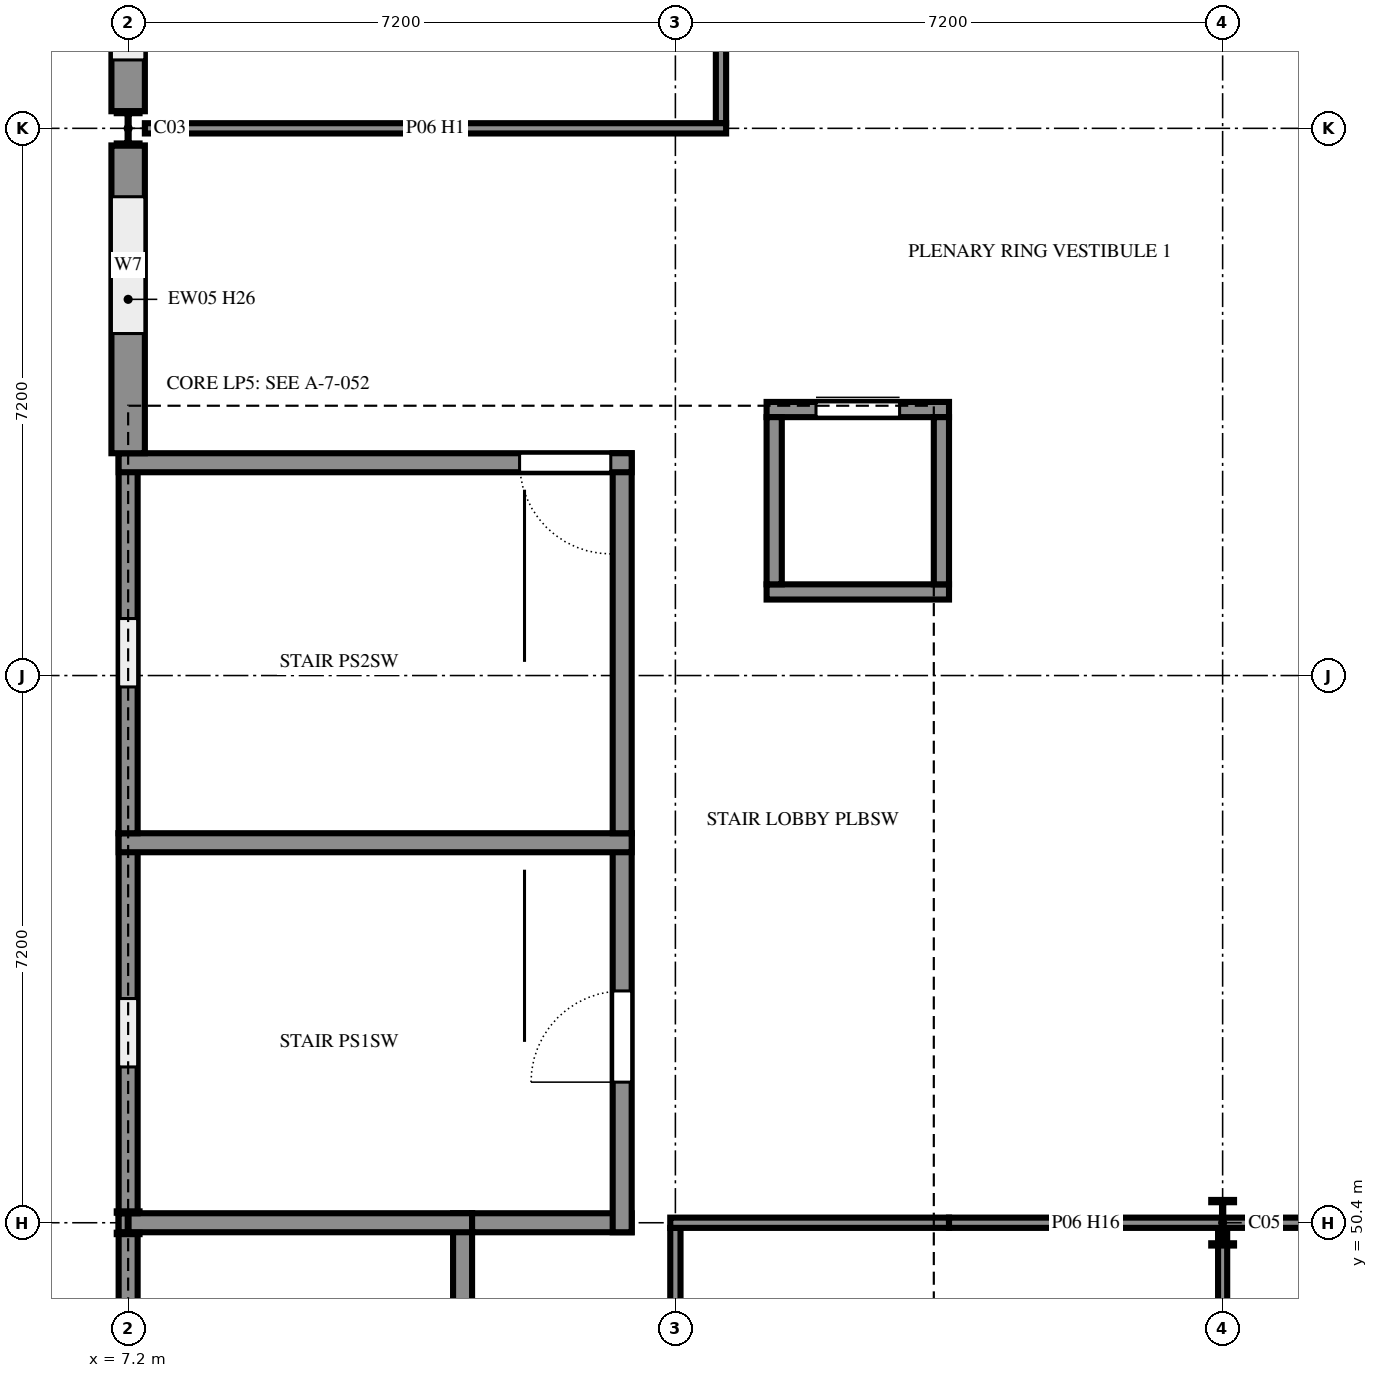
"""IFC4 building model, lengths in metres.
Left out: names, types, materials, properties, quantities, classifications, styles, units other than length and angle.
Written with IfcOpenShell. Run it as: python <this file> out.ifc"""

import sys

from ifc_helpers import new_model, si_unit, direction, frame, frame_2d, origin, origin_2d, place, context, subcontext, project, spatial, rectangle, i_section, extrude, element, fill, save


model = new_model("IFC4")
c1 = context("Model", 3, precision=1e-05, world=origin(), true_north=direction((0.0, 1.0)))
c2 = subcontext(c1, "Body", "Model", "MODEL_VIEW")
j1 = project(units=[si_unit("LENGTHUNIT", "METRE"), si_unit("PLANEANGLEUNIT", "RADIAN")], contexts=[c1])
p1 = place(None, origin())
s1 = spatial("IfcSite", under=j1, at=p1, CompositionType="ELEMENT")
p2 = place(p1, origin())
s2 = spatial("IfcBuilding", under=s1, at=p2, CompositionType="ELEMENT")
p3 = place(p2, frame((0.0, 0.0, 14.4)))
s3 = spatial("IfcBuildingStorey", under=s2, at=p3, CompositionType="ELEMENT", Elevation=14.4)
p4 = place(p3, frame((7.2, 50.4, 0.0), z_axis=(0.0, 0.0, 1.0), x_axis=(1.0, 0.0, 0.0)))
e1 = element("IfcColumn", 1, at=p4, inside=s3, PredefinedType="COLUMN", context=c2, shape_type="SweptSolid", body=[
    extrude(i_section(OverallWidth=0.3, OverallDepth=0.3, WebThickness=0.011, FlangeThickness=0.019, FilletRadius=0.027, at=origin_2d()), origin(), (0.0, 0.0, 1.0), 3.6),
])
p5 = place(p3, frame((21.6, 50.4, 0.0), z_axis=(0.0, 0.0, 1.0), x_axis=(1.0, 0.0, 0.0)))
e2 = element("IfcColumn", 2, at=p5, inside=s3, PredefinedType="COLUMN", context=c2, shape_type="SweptSolid", body=[
    extrude(i_section(OverallWidth=0.3, OverallDepth=0.6, WebThickness=0.015, FlangeThickness=0.03, FilletRadius=0.027, at=origin_2d()), origin(), (0.0, 0.0, 1.0), 3.6),
])
p6 = place(p3, frame((7.2, 64.8, 0.0), z_axis=(0.0, 0.0, 1.0), x_axis=(1.0, 0.0, 0.0)))
e3 = element("IfcColumn", 3, at=p6, inside=s3, PredefinedType="COLUMN", context=c2, shape_type="SweptSolid", body=[
    extrude(i_section(OverallWidth=0.3, OverallDepth=0.45, WebThickness=0.014, FlangeThickness=0.026, FilletRadius=0.027, at=origin_2d()), origin(), (0.0, 0.0, 1.0), 3.6),
])
p7 = place(p3, frame((11.6, 44.275, 0.0), z_axis=(0.0, 0.0, 1.0), x_axis=(0.0, 1.0, 0.0)))
e4 = element("IfcWall", 4, at=p7, inside=s3, PredefinedType="SHEAR", context=c2, shape_type="SweptSolid", body=[
    extrude(rectangle(XDim=6.25, YDim=0.25, at=frame_2d((3.125, 0.0))), origin(), (0.0, 0.0, 1.0), 3.6),
])
p8 = place(p7, frame((0.375, 0.0, 0.0)))
e5 = element("IfcOpeningElement", 5, at=p8, cuts=e4, PredefinedType="OPENING", context=c2, shape_type="SweptSolid", body=[
    extrude(rectangle(XDim=1.0, YDim=2.4, at=frame_2d((0.5, 1.2))), frame((0.0, 0.135, 0.0), z_axis=(0.0, -1.0, 0.0), x_axis=(1.0, 0.0, 0.0)), (0.0, 0.0, 1.0), 0.27),
])
p9 = place(p3, frame((7.2, 50.525, 0.0), z_axis=(0.0, 0.0, 1.0), x_axis=(0.0, -1.0, 0.0)))
e6 = element("IfcWall", 6, at=p9, inside=s3, PredefinedType="SHEAR", context=c2, shape_type="SweptSolid", body=[
    extrude(rectangle(XDim=6.25, YDim=0.25, at=frame_2d((3.125, 0.0))), origin(), (0.0, 0.0, 1.0), 3.6),
])
p10 = place(p9, frame((2.675, 0.0, 0.6)))
e7 = element("IfcOpeningElement", 7, at=p10, cuts=e6, PredefinedType="OPENING", context=c2, shape_type="SweptSolid", body=[
    extrude(rectangle(XDim=0.9, YDim=2.1, at=frame_2d((0.45, 1.05))), frame((0.0, 0.135, 0.0), z_axis=(0.0, -1.0, 0.0), x_axis=(1.0, 0.0, 0.0)), (0.0, 0.0, 1.0), 0.27),
])
p11 = place(p3, frame((11.725, 50.4, 0.0), z_axis=(0.0, 0.0, 1.0), x_axis=(-1.0, 0.0, 0.0)))
e8 = element("IfcWall", 8, at=p11, inside=s3, PredefinedType="SHEAR", context=c2, shape_type="SweptSolid", body=[
    extrude(rectangle(XDim=4.65, YDim=0.25, at=frame_2d((2.325, 0.0))), origin(), (0.0, 0.0, 1.0), 3.6),
])
p12 = place(p3, frame((11.725, 50.4, 0.0), z_axis=(0.0, 0.0, 1.0), x_axis=(1.0, 0.0, 0.0)))
e9 = element("IfcWall", 9, at=p12, inside=s3, PredefinedType="SHEAR", context=c2, shape_type="SweptSolid", body=[
    extrude(rectangle(XDim=2.1, YDim=0.25, at=frame_2d((1.05, 0.0))), origin(), (0.0, 0.0, 1.0), 3.6),
])
p13 = place(p3, frame((13.7, 50.275, 0.0), z_axis=(0.0, 0.0, 1.0), x_axis=(0.0, 1.0, 0.0)))
e10 = element("IfcWall", 10, at=p13, inside=s3, PredefinedType="SHEAR", context=c2, shape_type="SweptSolid", body=[
    extrude(rectangle(XDim=5.25, YDim=0.25, at=frame_2d((2.625, 0.0))), origin(), (0.0, 0.0, 1.0), 3.6),
])
p14 = place(p13, frame((1.975, 0.0, 0.0)))
e11 = element("IfcOpeningElement", 11, at=p14, cuts=e10, PredefinedType="OPENING", context=c2, shape_type="SweptSolid", body=[
    extrude(rectangle(XDim=1.2, YDim=2.4, at=frame_2d((0.6, 1.2))), frame((0.0, 0.135, 0.0), z_axis=(0.0, -1.0, 0.0), x_axis=(1.0, 0.0, 0.0)), (0.0, 0.0, 1.0), 0.27),
])
p15 = place(p3, frame((7.2, 55.525, 0.0), z_axis=(0.0, 0.0, 1.0), x_axis=(0.0, -1.0, 0.0)))
e12 = element("IfcWall", 12, at=p15, inside=s3, PredefinedType="SHEAR", context=c2, shape_type="SweptSolid", body=[
    extrude(rectangle(XDim=5.0, YDim=0.25, at=frame_2d((2.5, 0.0))), origin(), (0.0, 0.0, 1.0), 3.6),
])
p16 = place(p15, frame((2.175, 0.0, 0.6)))
e13 = element("IfcOpeningElement", 13, at=p16, cuts=e12, PredefinedType="OPENING", context=c2, shape_type="SweptSolid", body=[
    extrude(rectangle(XDim=0.9, YDim=2.1, at=frame_2d((0.45, 1.05))), frame((0.0, 0.135, 0.0), z_axis=(0.0, -1.0, 0.0), x_axis=(1.0, 0.0, 0.0)), (0.0, 0.0, 1.0), 0.27),
])
p17 = place(p3, frame((13.825, 55.4, 0.0), z_axis=(0.0, 0.0, 1.0), x_axis=(-1.0, 0.0, 0.0)))
e14 = element("IfcWall", 14, at=p17, inside=s3, PredefinedType="SHEAR", context=c2, shape_type="SweptSolid", body=[
    extrude(rectangle(XDim=6.75, YDim=0.25, at=frame_2d((3.375, 0.0))), origin(), (0.0, 0.0, 1.0), 3.6),
])
p18 = place(p3, frame((13.7, 55.525, 0.0), z_axis=(0.0, 0.0, 1.0), x_axis=(0.0, 1.0, 0.0)))
e15 = element("IfcWall", 15, at=p18, inside=s3, PredefinedType="SHEAR", context=c2, shape_type="SweptSolid", body=[
    extrude(rectangle(XDim=5.0, YDim=0.25, at=frame_2d((2.5, 0.0))), origin(), (0.0, 0.0, 1.0), 3.6),
])
p19 = place(p3, frame((7.2, 60.525, 0.0), z_axis=(0.0, 0.0, 1.0), x_axis=(0.0, -1.0, 0.0)))
e16 = element("IfcWall", 16, at=p19, inside=s3, PredefinedType="SHEAR", context=c2, shape_type="SweptSolid", body=[
    extrude(rectangle(XDim=5.0, YDim=0.25, at=frame_2d((2.5, 0.0))), origin(), (0.0, 0.0, 1.0), 3.6),
])
p20 = place(p19, frame((2.175, 0.0, 0.6)))
e17 = element("IfcOpeningElement", 17, at=p20, cuts=e16, PredefinedType="OPENING", context=c2, shape_type="SweptSolid", body=[
    extrude(rectangle(XDim=0.9, YDim=2.1, at=frame_2d((0.45, 1.05))), frame((0.0, 0.135, 0.0), z_axis=(0.0, -1.0, 0.0), x_axis=(1.0, 0.0, 0.0)), (0.0, 0.0, 1.0), 0.27),
])
p21 = place(p3, frame((13.825, 60.4, 0.0), z_axis=(0.0, 0.0, 1.0), x_axis=(-1.0, 0.0, 0.0)))
e18 = element("IfcWall", 18, at=p21, inside=s3, PredefinedType="SHEAR", context=c2, shape_type="SweptSolid", body=[
    extrude(rectangle(XDim=6.75, YDim=0.25, at=frame_2d((3.375, 0.0))), origin(), (0.0, 0.0, 1.0), 3.6),
])
p22 = place(p21, frame((0.275, 0.0, 0.0)))
e19 = element("IfcOpeningElement", 19, at=p22, cuts=e18, PredefinedType="OPENING", context=c2, shape_type="SweptSolid", body=[
    extrude(rectangle(XDim=1.2, YDim=2.4, at=frame_2d((0.6, 1.2))), frame((0.0, 0.135, 0.0), z_axis=(0.0, -1.0, 0.0), x_axis=(1.0, 0.0, 0.0)), (0.0, 0.0, 1.0), 0.27),
])
p23 = place(p3, frame((7.2, 78.975, 0.0), z_axis=(0.0, 0.0, 1.0), x_axis=(0.0, -1.0, 0.0)))
e20 = element("IfcWall", 20, at=p23, inside=s3, PredefinedType="SOLIDWALL", context=c2, shape_type="SweptSolid", body=[
    extrude(rectangle(XDim=13.95, YDim=0.44, at=frame_2d((6.975, 0.0))), origin(), (0.0, 0.0, 1.0), 2.82),
])
p24 = place(p23, frame((11.475, 0.0, 0.75)))
e21 = element("IfcOpeningElement", 21, at=p24, cuts=e20, PredefinedType="OPENING", context=c2, shape_type="SweptSolid", body=[
    extrude(rectangle(XDim=1.8, YDim=1.8, at=frame_2d((0.9, 0.9))), frame((0.0, 0.23, 0.0), z_axis=(0.0, -1.0, 0.0), x_axis=(1.0, 0.0, 0.0)), (0.0, 0.0, 1.0), 0.46),
])
p25 = place(p23, frame((7.875, 0.0, 0.75)))
e22 = element("IfcOpeningElement", 22, at=p25, cuts=e20, PredefinedType="OPENING", context=c2, shape_type="SweptSolid", body=[
    extrude(rectangle(XDim=1.8, YDim=1.8, at=frame_2d((0.9, 0.9))), frame((0.0, 0.23, 0.0), z_axis=(0.0, -1.0, 0.0), x_axis=(1.0, 0.0, 0.0)), (0.0, 0.0, 1.0), 0.46),
])
p26 = place(p23, frame((4.275, 0.0, 0.75)))
e23 = element("IfcOpeningElement", 23, at=p26, cuts=e20, PredefinedType="OPENING", context=c2, shape_type="SweptSolid", body=[
    extrude(rectangle(XDim=0.65, YDim=1.8, at=frame_2d((0.325, 0.9))), frame((0.0, 0.23, 0.0), z_axis=(0.0, -1.0, 0.0), x_axis=(1.0, 0.0, 0.0)), (0.0, 0.0, 1.0), 0.46),
])
p27 = place(p23, frame((5.425, 0.0, 0.75)))
e24 = element("IfcOpeningElement", 24, at=p27, cuts=e20, PredefinedType="OPENING", context=c2, shape_type="SweptSolid", body=[
    extrude(rectangle(XDim=0.65, YDim=1.8, at=frame_2d((0.325, 0.9))), frame((0.0, 0.23, 0.0), z_axis=(0.0, -1.0, 0.0), x_axis=(1.0, 0.0, 0.0)), (0.0, 0.0, 1.0), 0.46),
])
p28 = place(p23, frame((0.675, 0.0, 0.75)))
e25 = element("IfcOpeningElement", 25, at=p28, cuts=e20, PredefinedType="OPENING", context=c2, shape_type="SweptSolid", body=[
    extrude(rectangle(XDim=1.8, YDim=1.8, at=frame_2d((0.9, 0.9))), frame((0.0, 0.23, 0.0), z_axis=(0.0, -1.0, 0.0), x_axis=(1.0, 0.0, 0.0)), (0.0, 0.0, 1.0), 0.46),
])
p29 = place(p3, frame((7.2, 64.575, 0.0), z_axis=(0.0, 0.0, 1.0), x_axis=(0.0, -1.0, 0.0)))
e26 = element("IfcWall", 26, at=p29, inside=s3, PredefinedType="SOLIDWALL", context=c2, shape_type="SweptSolid", body=[
    extrude(rectangle(XDim=4.05, YDim=0.44, at=frame_2d((2.025, 0.0))), origin(), (0.0, 0.0, 1.0), 3.15),
])
p30 = place(p29, frame((0.675, 0.0, 0.75)))
e27 = element("IfcOpeningElement", 27, at=p30, cuts=e26, PredefinedType="OPENING", context=c2, shape_type="SweptSolid", body=[
    extrude(rectangle(XDim=1.8, YDim=1.8, at=frame_2d((0.9, 0.9))), frame((0.0, 0.23, 0.0), z_axis=(0.0, -1.0, 0.0), x_axis=(1.0, 0.0, 0.0)), (0.0, 0.0, 1.0), 0.46),
])
p31 = place(p3, frame((15.6, 58.7, 0.0), z_axis=(0.0, 0.0, 1.0), x_axis=(1.0, 0.0, 0.0)))
e28 = element("IfcWall", 28, at=p31, inside=s3, PredefinedType="SHEAR", context=c2, shape_type="SweptSolid", body=[
    extrude(rectangle(XDim=2.4, YDim=0.2, at=frame_2d((1.2, 0.0))), origin(), (0.0, 0.0, 1.0), 4.5),
])
p32 = place(p3, frame((15.6, 61.1, 0.0), z_axis=(0.0, 0.0, 1.0), x_axis=(1.0, 0.0, 0.0)))
e29 = element("IfcWall", 29, at=p32, inside=s3, PredefinedType="SHEAR", context=c2, shape_type="SweptSolid", body=[
    extrude(rectangle(XDim=2.4, YDim=0.2, at=frame_2d((1.2, 0.0))), origin(), (0.0, 0.0, 1.0), 4.5),
])
p33 = place(p32, frame((0.65, 0.0, 0.0)))
e30 = element("IfcOpeningElement", 30, at=p33, cuts=e29, PredefinedType="OPENING", context=c2, shape_type="SweptSolid", body=[
    extrude(rectangle(XDim=1.1, YDim=2.1, at=frame_2d((0.55, 1.05))), frame((0.0, 0.11, 0.0), z_axis=(0.0, -1.0, 0.0), x_axis=(1.0, 0.0, 0.0)), (0.0, 0.0, 1.0), 0.22),
])
for number, where, z_axis, x_axis in (
    (31, (15.7, 58.8, 0.0), (0.0, 0.0, 1.0), (0.0, 1.0, 0.0)),
    (32, (17.9, 58.8, 0.0), (0.0, 0.0, 1.0), (0.0, 1.0, 0.0)),
):
    element("IfcWall", number, at=place(p3, frame(where, z_axis=z_axis, x_axis=x_axis)), inside=s3, PredefinedType="SHEAR", context=c2, shape_type="SweptSolid", body=[
        extrude(rectangle(XDim=2.2, YDim=0.2, at=frame_2d((1.1, 0.0))), origin(), (0.0, 0.0, 1.0), 4.5),
    ])
p34 = place(p3, frame((14.4, 50.333, 0.0), z_axis=(0.0, 0.0, 1.0), x_axis=(0.0, -1.0, 0.0)))
e33 = element("IfcWall", 33, at=p34, inside=s3, PredefinedType="PARTITIONING", context=c2, shape_type="SweptSolid", body=[
    extrude(rectangle(XDim=14.265, YDim=0.135, at=frame_2d((7.133, 0.0))), origin(), (0.0, 0.0, 1.0), 3.12),
])
p35 = place(p34, frame((6.35, 0.0, 0.0)))
e34 = element("IfcOpeningElement", 34, at=p35, cuts=e33, PredefinedType="OPENING", context=c2, shape_type="SweptSolid", body=[
    extrude(rectangle(XDim=1.5, YDim=2.1, at=frame_2d((0.75, 1.05))), frame((0.0, 0.077, 0.0), z_axis=(0.0, -1.0, 0.0), x_axis=(1.0, 0.0, 0.0)), (0.0, 0.0, 1.0), 0.155),
])
p36 = place(p3, frame((18.0, 50.4, 0.0), z_axis=(0.0, 0.0, 1.0), x_axis=(-1.0, 0.0, 0.0)))
e35 = element("IfcWall", 35, at=p36, inside=s3, PredefinedType="PARTITIONING", context=c2, shape_type="SweptSolid", body=[
    extrude(rectangle(XDim=3.667, YDim=0.135, at=frame_2d((1.834, 0.0))), origin(), (0.0, 0.0, 1.0), 3.09),
])
p37 = place(p3, frame((21.6, 50.333, 0.0), z_axis=(0.0, 0.0, 1.0), x_axis=(0.0, -1.0, 0.0)))
e36 = element("IfcWall", 36, at=p37, inside=s3, PredefinedType="MOVABLE", context=c2, shape_type="SweptSolid", body=[
    extrude(rectangle(XDim=6.833, YDim=0.12, at=frame_2d((3.416, 0.0))), origin(), (0.0, 0.0, 1.0), 3.12),
])
p38 = place(p3, frame((18.0, 50.4, 0.0), z_axis=(0.0, 0.0, 1.0), x_axis=(1.0, 0.0, 0.0)))
e37 = element("IfcWall", 37, at=p38, inside=s3, PredefinedType="PARTITIONING", context=c2, shape_type="SweptSolid", body=[
    extrude(rectangle(XDim=3.6, YDim=0.135, at=frame_2d((1.8, 0.0))), origin(), (0.0, 0.0, 1.0), 3.09),
])
p39 = place(p3, frame((21.6, 50.4, 0.0), z_axis=(0.0, 0.0, 1.0), x_axis=(1.0, 0.0, 0.0)))
e38 = element("IfcWall", 38, at=p39, inside=s3, PredefinedType="PARTITIONING", context=c2, shape_type="SweptSolid", body=[
    extrude(rectangle(XDim=7.2, YDim=0.135, at=frame_2d((3.6, 0.0))), origin(), (0.0, 0.0, 1.0), 2.82),
])
p40 = place(p39, frame((2.85, 0.0, 0.0)))
e39 = element("IfcOpeningElement", 39, at=p40, cuts=e38, PredefinedType="OPENING", context=c2, shape_type="SweptSolid", body=[
    extrude(rectangle(XDim=1.5, YDim=2.1, at=frame_2d((0.75, 1.05))), frame((0.0, 0.077, 0.0), z_axis=(0.0, -1.0, 0.0), x_axis=(1.0, 0.0, 0.0)), (0.0, 0.0, 1.0), 0.155),
])
p41 = place(p3, frame((15.0, 73.663, 0.0), z_axis=(0.0, 0.0, 1.0), x_axis=(0.0, -1.0, 0.0)))
e40 = element("IfcWall", 40, at=p41, inside=s3, PredefinedType="PARTITIONING", context=c2, shape_type="SweptSolid", body=[
    extrude(rectangle(XDim=8.795, YDim=0.135, at=frame_2d((4.397, 0.0))), origin(), (0.0, 0.0, 1.0), 3.42),
])
p42 = place(p41, frame((3.65, 0.0, 0.0)))
e41 = element("IfcOpeningElement", 41, at=p42, cuts=e40, PredefinedType="OPENING", context=c2, shape_type="SweptSolid", body=[
    extrude(rectangle(XDim=1.5, YDim=2.1, at=frame_2d((0.75, 1.05))), frame((0.0, 0.077, 0.0), z_axis=(0.0, -1.0, 0.0), x_axis=(1.0, 0.0, 0.0)), (0.0, 0.0, 1.0), 0.155),
])
p43 = place(p3, frame((15.067, 64.8, 0.0), z_axis=(0.0, 0.0, 1.0), x_axis=(-1.0, 0.0, 0.0)))
e42 = element("IfcWall", 42, at=p43, inside=s3, PredefinedType="PARTITIONING", context=c2, shape_type="SweptSolid", body=[
    extrude(rectangle(XDim=7.647, YDim=0.135, at=frame_2d((3.824, 0.0))), origin(), (0.0, 0.0, 1.0), 2.82),
])
p44 = place(p24, origin())
e43 = element("IfcWindow", 43, at=p44, inside=s3, PartitioningType="SINGLE_PANEL", PredefinedType="WINDOW", context=c2, shape_type="SweptSolid", body=[
    extrude(rectangle(XDim=1.8, YDim=1.8, at=frame_2d((0.9, 0.9))), frame((0.0, 0.03, 0.0), z_axis=(0.0, -1.0, 0.0), x_axis=(1.0, 0.0, 0.0)), (0.0, 0.0, 1.0), 0.06),
])
fill(e21, e43)
p45 = place(p30, origin())
e44 = element("IfcWindow", 44, at=p45, inside=s3, PartitioningType="SINGLE_PANEL", PredefinedType="WINDOW", context=c2, shape_type="SweptSolid", body=[
    extrude(rectangle(XDim=1.8, YDim=1.8, at=frame_2d((0.9, 0.9))), frame((0.0, 0.03, 0.0), z_axis=(0.0, -1.0, 0.0), x_axis=(1.0, 0.0, 0.0)), (0.0, 0.0, 1.0), 0.06),
])
fill(e27, e44)
p46 = place(p20, origin())
e45 = element("IfcWindow", 45, at=p46, inside=s3, PartitioningType="SINGLE_PANEL", PredefinedType="WINDOW", context=c2, shape_type="SweptSolid", body=[
    extrude(rectangle(XDim=0.9, YDim=2.1, at=frame_2d((0.45, 1.05))), frame((0.0, 0.03, 0.0), z_axis=(0.0, -1.0, 0.0), x_axis=(1.0, 0.0, 0.0)), (0.0, 0.0, 1.0), 0.06),
])
fill(e17, e45)
p47 = place(p16, origin())
e46 = element("IfcWindow", 46, at=p47, inside=s3, PartitioningType="SINGLE_PANEL", PredefinedType="WINDOW", context=c2, shape_type="SweptSolid", body=[
    extrude(rectangle(XDim=0.9, YDim=2.1, at=frame_2d((0.45, 1.05))), frame((0.0, 0.03, 0.0), z_axis=(0.0, -1.0, 0.0), x_axis=(1.0, 0.0, 0.0)), (0.0, 0.0, 1.0), 0.06),
])
fill(e13, e46)
p48 = place(p33, origin())
e47 = element("IfcDoor", 47, at=p48, inside=s3, OperationType="SLIDING_TO_LEFT", PredefinedType="DOOR", context=c2, shape_type="SweptSolid", body=[
    extrude(rectangle(XDim=1.1, YDim=2.1, at=frame_2d((0.55, 1.05))), frame((0.0, 0.025, 0.0), z_axis=(0.0, -1.0, 0.0), x_axis=(1.0, 0.0, 0.0)), (0.0, 0.0, 1.0), 0.05),
])
fill(e30, e47)
p49 = place(p14, origin())
e48 = element("IfcDoor", 48, at=p49, inside=s3, OperationType="SINGLE_SWING_RIGHT", PredefinedType="DOOR", context=c2, shape_type="SweptSolid", body=[
    extrude(rectangle(XDim=1.2, YDim=2.4, at=frame_2d((0.6, 1.2))), frame((0.0, 0.025, 0.0), z_axis=(0.0, -1.0, 0.0), x_axis=(1.0, 0.0, 0.0)), (0.0, 0.0, 1.0), 0.05),
])
fill(e11, e48)
p50 = place(p22, origin())
e49 = element("IfcDoor", 49, at=p50, inside=s3, OperationType="SINGLE_SWING_RIGHT", PredefinedType="DOOR", context=c2, shape_type="SweptSolid", body=[
    extrude(rectangle(XDim=1.2, YDim=2.4, at=frame_2d((0.6, 1.2))), frame((0.0, 0.025, 0.0), z_axis=(0.0, -1.0, 0.0), x_axis=(1.0, 0.0, 0.0)), (0.0, 0.0, 1.0), 0.05),
])
fill(e19, e49)
save(model, sys.argv[1])
